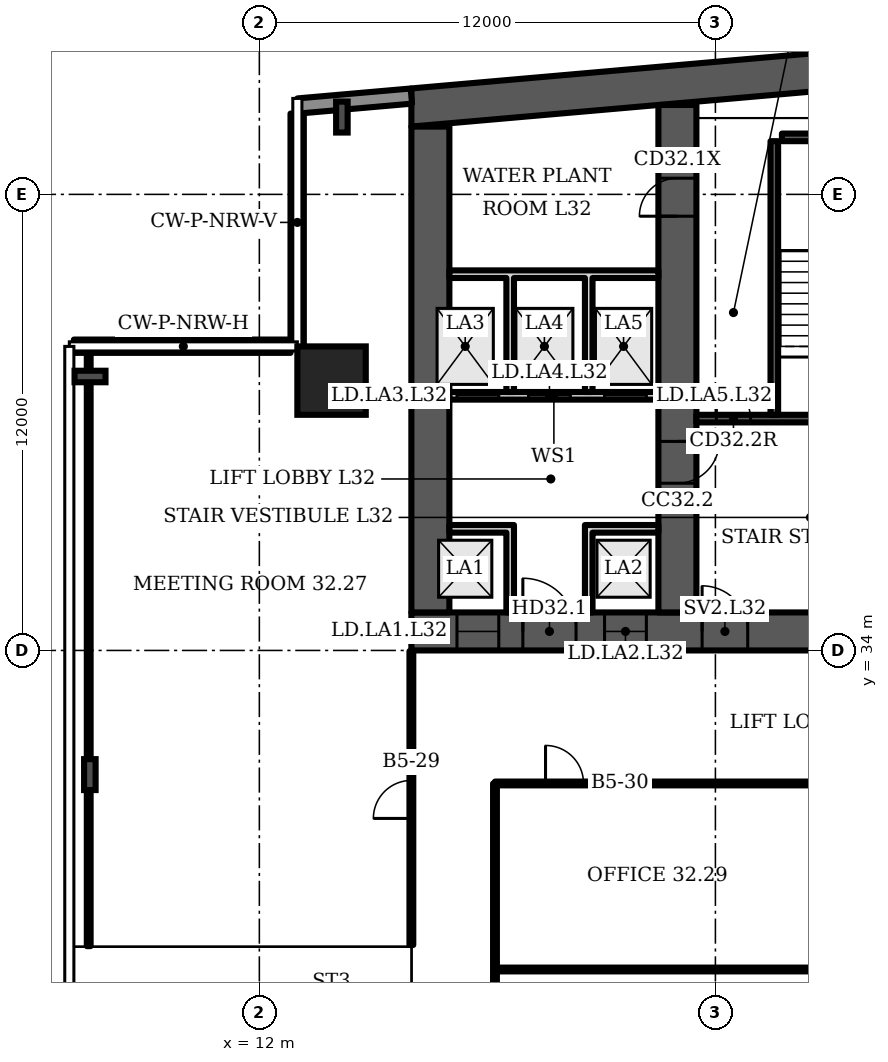
"""IFC4 building model, lengths in metres.
Left out: names, types, materials, properties, quantities, classifications, styles, units other than length and angle.
Written with IfcOpenShell. Run it as: python <this file> out.ifc"""

import sys

from ifc_helpers import new_model, si_unit, direction, frame, frame_2d, origin, origin_2d, place, context, subcontext, project, spatial, polyline, rectangle, i_section, outline, extrude, element, fill, save


model = new_model("IFC4")
c1 = context("Model", 3, precision=1e-05, world=origin(), true_north=direction((0.0, 1.0)))
c2 = subcontext(c1, "Body", "Model", "MODEL_VIEW")
j1 = project(units=[si_unit("LENGTHUNIT", "METRE"), si_unit("PLANEANGLEUNIT", "RADIAN")], contexts=[c1])
p1 = place(None, origin())
s1 = spatial("IfcSite", under=j1, at=p1, CompositionType="ELEMENT")
p2 = place(p1, origin())
s2 = spatial("IfcBuilding", under=s1, at=p2, CompositionType="ELEMENT")
p3 = place(p2, frame((0.0, 0.0, 136.3)))
s3 = spatial("IfcBuildingStorey", under=s2, at=p3, CompositionType="ELEMENT", Elevation=136.3)
p4 = place(p3, frame((0.0, 0.0, -0.0)))
e1 = element("IfcWall", 1, at=p4, inside=s3, PredefinedType="SHEAR", context=c2, shape_type="SweptSolid", body=[
    extrude(outline(polyline([(16.0, 47.784), (40.5, 49.927), (65.0, 47.784), (65.0, 48.787), (40.5, 50.931), (16.0, 48.787), (16.0, 47.784)])), origin(), (0.0, 0.0, 1.0), 3.6),
])
p5 = place(p3, frame((16.0, 34.5, 0.0), z_axis=(0.0, 0.0, 1.0), x_axis=(1.0, 0.0, 0.0)))
e2 = element("IfcWall", 2, at=p5, inside=s3, PredefinedType="SHEAR", context=c2, shape_type="SweptSolid", body=[
    extrude(rectangle(XDim=49.0, YDim=1.0, at=frame_2d((24.5, 0.0))), origin(), (0.0, 0.0, 1.0), 3.6),
])
p6 = place(p5, frame((1.2, 0.0, 0.0)))
e3 = element("IfcOpeningElement", 3, at=p6, cuts=e2, PredefinedType="OPENING", context=c2, shape_type="SweptSolid", body=[
    extrude(rectangle(XDim=1.1, YDim=2.1, at=frame_2d((0.55, 1.05))), frame((0.0, 0.51, 0.0), z_axis=(0.0, -1.0, 0.0), x_axis=(1.0, 0.0, 0.0)), (0.0, 0.0, 1.0), 1.02),
])
p7 = place(p5, frame((5.083, 0.0, 0.0)))
e4 = element("IfcOpeningElement", 4, at=p7, cuts=e2, PredefinedType="OPENING", context=c2, shape_type="SweptSolid", body=[
    extrude(rectangle(XDim=1.1, YDim=2.1, at=frame_2d((0.55, 1.05))), frame((0.0, 0.51, 0.0), z_axis=(0.0, -1.0, 0.0), x_axis=(1.0, 0.0, 0.0)), (0.0, 0.0, 1.0), 1.02),
])
p8 = place(p5, frame((2.933, 0.0, 0.0)))
e5 = element("IfcOpeningElement", 5, at=p8, cuts=e2, PredefinedType="OPENING", context=c2, shape_type="SweptSolid", body=[
    extrude(rectangle(XDim=1.4, YDim=2.1, at=frame_2d((0.7, 1.05))), frame((0.0, 0.51, 0.0), z_axis=(0.0, -1.0, 0.0), x_axis=(1.0, 0.0, 0.0)), (0.0, 0.0, 1.0), 1.02),
])
p9 = place(p5, frame((7.65, 0.0, 0.0)))
e6 = element("IfcOpeningElement", 6, at=p9, cuts=e2, PredefinedType="OPENING", context=c2, shape_type="SweptSolid", body=[
    extrude(rectangle(XDim=1.2, YDim=2.1, at=frame_2d((0.6, 1.05))), frame((0.0, 0.51, 0.0), z_axis=(0.0, -1.0, 0.0), x_axis=(1.0, 0.0, 0.0)), (0.0, 0.0, 1.0), 1.02),
])
p10 = place(p5, frame((14.817, 0.0, 0.0)))
e7 = element("IfcOpeningElement", 7, at=p10, cuts=e2, PredefinedType="OPENING", context=c2, shape_type="SweptSolid", body=[
    extrude(rectangle(XDim=1.1, YDim=2.1, at=frame_2d((0.55, 1.05))), frame((0.0, 0.51, 0.0), z_axis=(0.0, -1.0, 0.0), x_axis=(1.0, 0.0, 0.0)), (0.0, 0.0, 1.0), 1.02),
])
p11 = place(p5, frame((19.083, 0.0, 0.0)))
e8 = element("IfcOpeningElement", 8, at=p11, cuts=e2, PredefinedType="OPENING", context=c2, shape_type="SweptSolid", body=[
    extrude(rectangle(XDim=1.1, YDim=2.1, at=frame_2d((0.55, 1.05))), frame((0.0, 0.51, 0.0), z_axis=(0.0, -1.0, 0.0), x_axis=(1.0, 0.0, 0.0)), (0.0, 0.0, 1.0), 1.02),
])
p12 = place(p5, frame((16.8, 0.0, 0.0)))
e9 = element("IfcOpeningElement", 9, at=p12, cuts=e2, PredefinedType="OPENING", context=c2, shape_type="SweptSolid", body=[
    extrude(rectangle(XDim=1.4, YDim=2.1, at=frame_2d((0.7, 1.05))), frame((0.0, 0.51, 0.0), z_axis=(0.0, -1.0, 0.0), x_axis=(1.0, 0.0, 0.0)), (0.0, 0.0, 1.0), 1.02),
])
p13 = place(p5, frame((21.817, 0.0, 0.0)))
e10 = element("IfcOpeningElement", 10, at=p13, cuts=e2, PredefinedType="OPENING", context=c2, shape_type="SweptSolid", body=[
    extrude(rectangle(XDim=1.1, YDim=2.1, at=frame_2d((0.55, 1.05))), frame((0.0, 0.51, 0.0), z_axis=(0.0, -1.0, 0.0), x_axis=(1.0, 0.0, 0.0)), (0.0, 0.0, 1.0), 1.02),
])
p14 = place(p5, frame((26.083, 0.0, 0.0)))
e11 = element("IfcOpeningElement", 11, at=p14, cuts=e2, PredefinedType="OPENING", context=c2, shape_type="SweptSolid", body=[
    extrude(rectangle(XDim=1.1, YDim=2.1, at=frame_2d((0.55, 1.05))), frame((0.0, 0.51, 0.0), z_axis=(0.0, -1.0, 0.0), x_axis=(1.0, 0.0, 0.0)), (0.0, 0.0, 1.0), 1.02),
])
p15 = place(p5, frame((33.15, 0.0, 0.0)))
e12 = element("IfcOpeningElement", 12, at=p15, cuts=e2, PredefinedType="OPENING", context=c2, shape_type="SweptSolid", body=[
    extrude(rectangle(XDim=1.2, YDim=2.1, at=frame_2d((0.6, 1.05))), frame((0.0, 0.51, 0.0), z_axis=(0.0, -1.0, 0.0), x_axis=(1.0, 0.0, 0.0)), (0.0, 0.0, 1.0), 1.02),
])
p16 = place(p5, frame((37.8, 0.0, 0.0)))
e13 = element("IfcOpeningElement", 13, at=p16, cuts=e2, PredefinedType="OPENING", context=c2, shape_type="SweptSolid", body=[
    extrude(rectangle(XDim=1.4, YDim=2.1, at=frame_2d((0.7, 1.05))), frame((0.0, 0.51, 0.0), z_axis=(0.0, -1.0, 0.0), x_axis=(1.0, 0.0, 0.0)), (0.0, 0.0, 1.0), 1.02),
])
p17 = place(p5, frame((42.817, 0.0, 0.0)))
e14 = element("IfcOpeningElement", 14, at=p17, cuts=e2, PredefinedType="OPENING", context=c2, shape_type="SweptSolid", body=[
    extrude(rectangle(XDim=1.1, YDim=2.1, at=frame_2d((0.55, 1.05))), frame((0.0, 0.51, 0.0), z_axis=(0.0, -1.0, 0.0), x_axis=(1.0, 0.0, 0.0)), (0.0, 0.0, 1.0), 1.02),
])
p18 = place(p5, frame((46.7, 0.0, 0.0)))
e15 = element("IfcOpeningElement", 15, at=p18, cuts=e2, PredefinedType="OPENING", context=c2, shape_type="SweptSolid", body=[
    extrude(rectangle(XDim=1.1, YDim=2.1, at=frame_2d((0.55, 1.05))), frame((0.0, 0.51, 0.0), z_axis=(0.0, -1.0, 0.0), x_axis=(1.0, 0.0, 0.0)), (0.0, 0.0, 1.0), 1.02),
])
p19 = place(p5, frame((44.667, 0.0, 0.0)))
e16 = element("IfcOpeningElement", 16, at=p19, cuts=e2, PredefinedType="OPENING", context=c2, shape_type="SweptSolid", body=[
    extrude(rectangle(XDim=1.4, YDim=2.1, at=frame_2d((0.7, 1.05))), frame((0.0, 0.51, 0.0), z_axis=(0.0, -1.0, 0.0), x_axis=(1.0, 0.0, 0.0)), (0.0, 0.0, 1.0), 1.02),
])
p20 = place(p3, frame((16.5, 35.0, 0.0), z_axis=(0.0, 0.0, 1.0), x_axis=(0.0, 1.0, 0.0)))
e17 = element("IfcWall", 17, at=p20, inside=s3, PredefinedType="SHEAR", context=c2, shape_type="SweptSolid", body=[
    extrude(rectangle(XDim=12.784, YDim=1.0, at=frame_2d((6.392, 0.0))), origin(), (0.0, 0.0, 1.0), 3.6),
])
p21 = place(p3, frame((23.0, 35.0, 0.0), z_axis=(0.0, 0.0, 1.0), x_axis=(0.0, 1.0, 0.0)))
e18 = element("IfcWall", 18, at=p21, inside=s3, PredefinedType="SHEAR", context=c2, shape_type="SweptSolid", body=[
    extrude(rectangle(XDim=13.352, YDim=1.0, at=frame_2d((6.676, 0.0))), origin(), (0.0, 0.0, 1.0), 3.6),
])
p22 = place(p21, frame((10.426, 0.0, 0.0)))
e19 = element("IfcOpeningElement", 19, at=p22, cuts=e18, PredefinedType="OPENING", context=c2, shape_type="SweptSolid", body=[
    extrude(rectangle(XDim=1.0, YDim=2.1, at=frame_2d((0.5, 1.05))), frame((0.0, 0.51, 0.0), z_axis=(0.0, -1.0, 0.0), x_axis=(1.0, 0.0, 0.0)), (0.0, 0.0, 1.0), 1.02),
])
p23 = place(p21, frame((3.4, 0.0, 0.0)))
e20 = element("IfcOpeningElement", 20, at=p23, cuts=e18, PredefinedType="OPENING", context=c2, shape_type="SweptSolid", body=[
    extrude(rectangle(XDim=1.1, YDim=2.1, at=frame_2d((0.55, 1.05))), frame((0.0, 0.51, 0.0), z_axis=(0.0, -1.0, 0.0), x_axis=(1.0, 0.0, 0.0)), (0.0, 0.0, 1.0), 1.02),
])
p24 = place(p3, frame((13.9, 41.1, 0.0), z_axis=(0.0, 0.0, 1.0), x_axis=(1.0, 0.0, 0.0)))
e21 = element("IfcColumn", 21, at=p24, inside=s3, PredefinedType="COLUMN", context=c2, shape_type="SweptSolid", body=[
    extrude(rectangle(XDim=1.8, YDim=1.8, at=origin_2d()), origin(), (0.0, 0.0, 1.0), 3.6),
])
for number, where, z_axis, x_axis in (
    (22, (14.172, 48.034, 0.0), (0.0, 0.0, 1.0), (-1.0, 0.0, 0.0)),
    (23, (7.544, 41.208, 0.0), (0.0, 0.0, 1.0), (0.0, 1.0, 0.0)),
    (24, (7.54, 30.733, 0.0), (0.0, 0.0, 1.0), (-1.0, 0.0, 0.0)),
):
    element("IfcColumn", number, at=place(p3, frame(where, z_axis=z_axis, x_axis=x_axis)), inside=s3, PredefinedType="COLUMN", context=c2, shape_type="SweptSolid", body=[
        extrude(i_section(OverallWidth=0.303, OverallDepth=0.814, WebThickness=0.021, FlangeThickness=0.04, FilletRadius=0.03, at=origin_2d()), origin(), (0.0, 0.0, 1.0), 3.6),
    ])
p25 = place(p3, frame((16.0, 48.587, 0.0), z_axis=(0.0, 0.0, 1.0), x_axis=(-0.996194, -0.087168, 0.0)))
e25 = element("IfcWall", 25, at=p25, inside=s3, PredefinedType="SOLIDWALL", context=c2, shape_type="SweptSolid", body=[
    extrude(rectangle(XDim=2.994, YDim=0.4, at=frame_2d((1.497, 0.0))), origin(), (0.0, 0.0, 1.0), 3.2),
])
p26 = place(p3, frame((12.995, 48.126, 0.0), z_axis=(0.0, 0.0, 1.0), x_axis=(0.0, -1.0, 0.0)))
e26 = element("IfcWall", 26, at=p26, inside=s3, PredefinedType="SOLIDWALL", context=c2, shape_type="SweptSolid", body=[
    extrude(rectangle(XDim=6.126, YDim=0.35, at=frame_2d((3.063, 0.0))), origin(), (0.0, 0.0, 1.0), 1.0),
])
p27 = place(p3, frame((12.82, 42.005, 0.0), z_axis=(0.0, 0.0, 1.0), x_axis=(-1.0, 0.0, 0.0)))
e27 = element("IfcWall", 27, at=p27, inside=s3, PredefinedType="SOLIDWALL", context=c2, shape_type="SweptSolid", body=[
    extrude(rectangle(XDim=5.7, YDim=0.35, at=frame_2d((2.85, 0.0))), origin(), (0.0, 0.0, 1.0), 1.0),
])
p28 = place(p3, frame((17.0, 40.7, 0.0), z_axis=(0.0, 0.0, 1.0), x_axis=(1.0, 0.0, 0.0)))
e28 = element("IfcWall", 28, at=p28, inside=s3, PredefinedType="PARTITIONING", context=c2, shape_type="SweptSolid", body=[
    extrude(rectangle(XDim=5.5, YDim=0.2, at=frame_2d((2.75, 0.0))), origin(), (0.0, 0.0, 1.0), 3.2),
])
p29 = place(p28, frame((0.2, 0.0, 0.0)))
e29 = element("IfcOpeningElement", 29, at=p29, cuts=e28, PredefinedType="OPENING", context=c2, shape_type="SweptSolid", body=[
    extrude(rectangle(XDim=1.1, YDim=2.1, at=frame_2d((0.55, 1.05))), frame((0.0, 0.11, 0.0), z_axis=(0.0, -1.0, 0.0), x_axis=(1.0, 0.0, 0.0)), (0.0, 0.0, 1.0), 0.22),
])
p30 = place(p28, frame((2.083, 0.0, 0.0)))
e30 = element("IfcOpeningElement", 30, at=p30, cuts=e28, PredefinedType="OPENING", context=c2, shape_type="SweptSolid", body=[
    extrude(rectangle(XDim=1.1, YDim=2.1, at=frame_2d((0.55, 1.05))), frame((0.0, 0.11, 0.0), z_axis=(0.0, -1.0, 0.0), x_axis=(1.0, 0.0, 0.0)), (0.0, 0.0, 1.0), 0.22),
])
p31 = place(p28, frame((4.083, 0.0, 0.0)))
e31 = element("IfcOpeningElement", 31, at=p31, cuts=e28, PredefinedType="OPENING", context=c2, shape_type="SweptSolid", body=[
    extrude(rectangle(XDim=1.1, YDim=2.1, at=frame_2d((0.55, 1.05))), frame((0.0, 0.11, 0.0), z_axis=(0.0, -1.0, 0.0), x_axis=(1.0, 0.0, 0.0)), (0.0, 0.0, 1.0), 0.22),
])
p32 = place(p3, frame((0.0, 0.0, -0.0)))
e32 = element("IfcWall", 32, at=p32, inside=s3, PredefinedType="PARTITIONING", context=c2, shape_type="SweptSolid", body=[
    extrude(outline(polyline([(18.5, 37.1), (17.0, 37.1), (17.0, 37.3), (18.5, 37.3), (18.7, 37.3), (18.7, 35.0), (18.5, 35.0), (18.5, 37.1)])), origin(), (0.0, 0.0, 1.0), 3.2),
])
p33 = place(p3, frame((0.0, 0.0, -0.0)))
e33 = element("IfcWall", 33, at=p33, inside=s3, PredefinedType="PARTITIONING", context=c2, shape_type="SweptSolid", body=[
    extrude(outline(polyline([(20.567, 37.3), (20.767, 37.3), (22.5, 37.3), (22.5, 37.1), (20.767, 37.1), (20.767, 35.0), (20.567, 35.0), (20.567, 37.3)])), origin(), (0.0, 0.0, 1.0), 3.2),
])
p34 = place(p3, frame((0.0, 0.0, -0.0)))
e34 = element("IfcWall", 34, at=p34, inside=s3, PredefinedType="PARTITIONING", context=c2, shape_type="SweptSolid", body=[
    extrude(outline(polyline([(18.7, 40.8), (18.5, 40.8), (18.5, 43.8), (17.0, 43.8), (17.0, 44.0), (22.5, 44.0), (22.5, 43.8), (20.767, 43.8), (20.767, 40.8), (20.567, 40.8), (20.567, 43.8), (18.7, 43.8), (18.7, 40.8)])), origin(), (0.0, 0.0, 1.0), 3.2),
])
p35 = place(p3, frame((23.5, 40.1, 0.0), z_axis=(0.0, 0.0, 1.0), x_axis=(1.0, 0.0, 0.0)))
e35 = element("IfcWall", 35, at=p35, inside=s3, PredefinedType="SHEAR", context=c2, shape_type="SweptSolid", body=[
    extrude(rectangle(XDim=6.0, YDim=0.2, at=frame_2d((3.0, 0.0))), origin(), (0.0, 0.0, 1.0), 3.2),
])
p36 = place(p35, frame((3.425, 0.0, 0.0)))
e36 = element("IfcOpeningElement", 36, at=p36, cuts=e35, PredefinedType="OPENING", context=c2, shape_type="SweptSolid", body=[
    extrude(rectangle(XDim=1.2, YDim=2.1, at=frame_2d((0.6, 1.05))), frame((0.0, 0.11, 0.0), z_axis=(0.0, -1.0, 0.0), x_axis=(1.0, 0.0, 0.0)), (0.0, 0.0, 1.0), 0.22),
])
p37 = place(p35, frame((0.525, 0.0, 0.0)))
e37 = element("IfcOpeningElement", 37, at=p37, cuts=e35, PredefinedType="OPENING", context=c2, shape_type="SweptSolid", body=[
    extrude(rectangle(XDim=0.9, YDim=2.1, at=frame_2d((0.45, 1.05))), frame((0.0, 0.11, 0.0), z_axis=(0.0, -1.0, 0.0), x_axis=(1.0, 0.0, 0.0)), (0.0, 0.0, 1.0), 0.22),
])
p38 = place(p3, frame((25.55, 40.2, 0.0), z_axis=(0.0, 0.0, 1.0), x_axis=(0.0, 1.0, 0.0)))
e38 = element("IfcWall", 38, at=p38, inside=s3, PredefinedType="SHEAR", context=c2, shape_type="SweptSolid", body=[
    extrude(rectangle(XDim=7.2, YDim=0.2, at=frame_2d((3.6, 0.0))), origin(), (0.0, 0.0, 1.0), 3.2),
])
p39 = place(p3, frame((25.75, 47.5, 0.0), z_axis=(0.0, 0.0, 1.0), x_axis=(1.0, 0.0, 0.0)))
e39 = element("IfcWall", 39, at=p39, inside=s3, PredefinedType="SHEAR", context=c2, shape_type="SweptSolid", body=[
    extrude(rectangle(XDim=3.75, YDim=0.2, at=frame_2d((1.875, 0.0))), origin(), (0.0, 0.0, 1.0), 3.2),
])
p40 = place(p3, frame((7.51, 26.22, 0.0), z_axis=(0.0, 0.0, 1.0), x_axis=(0.0, 1.0, 0.0)))
e40 = element("IfcWall", 40, at=p40, inside=s3, PredefinedType="PARTITIONING", context=c2, shape_type="SweptSolid", body=[
    extrude(rectangle(XDim=15.76, YDim=0.1, at=frame_2d((7.88, 0.0))), origin(), (0.0, 0.0, 1.0), 2.58),
])
p41 = place(p3, frame((16.0, 26.25, 0.0), z_axis=(0.0, 0.0, 1.0), x_axis=(0.0, 1.0, 0.0)))
e41 = element("IfcWall", 41, at=p41, inside=s3, PredefinedType="PARTITIONING", context=c2, shape_type="SweptSolid", body=[
    extrude(rectangle(XDim=7.73, YDim=0.1, at=frame_2d((3.865, 0.0))), origin(), (0.0, 0.0, 1.0), 3.2),
])
p42 = place(p41, frame((3.33, 0.0, 0.0)))
e42 = element("IfcOpeningElement", 42, at=p42, cuts=e41, PredefinedType="OPENING", context=c2, shape_type="SweptSolid", body=[
    extrude(rectangle(XDim=1.0, YDim=2.1, at=frame_2d((0.5, 1.05))), frame((0.0, 0.06, 0.0), z_axis=(0.0, -1.0, 0.0), x_axis=(1.0, 0.0, 0.0)), (0.0, 0.0, 1.0), 0.12),
])
p43 = place(p3, frame((18.2, 23.8, 0.0), z_axis=(0.0, 0.0, 1.0), x_axis=(0.0, 1.0, 0.0)))
e43 = element("IfcWall", 43, at=p43, inside=s3, PredefinedType="PARTITIONING", context=c2, shape_type="SweptSolid", body=[
    extrude(rectangle(XDim=6.7, YDim=0.1, at=frame_2d((3.35, 0.0))), origin(), (0.0, 0.0, 1.0), 3.2),
])
p44 = place(p3, frame((18.2, 25.605, 0.0), z_axis=(0.0, 0.0, 1.0), x_axis=(1.0, 0.0, 0.0)))
e44 = element("IfcWall", 44, at=p44, inside=s3, PredefinedType="PARTITIONING", context=c2, shape_type="SweptSolid", body=[
    extrude(rectangle(XDim=8.55, YDim=0.1, at=frame_2d((4.275, 0.0))), origin(), (0.0, 0.0, 1.0), 3.2),
])
p45 = place(p3, frame((18.2, 30.5, 0.0), z_axis=(0.0, 0.0, 1.0), x_axis=(1.0, 0.0, 0.0)))
e45 = element("IfcWall", 45, at=p45, inside=s3, PredefinedType="PARTITIONING", context=c2, shape_type="SweptSolid", body=[
    extrude(rectangle(XDim=18.65, YDim=0.1, at=frame_2d((9.325, 0.0))), origin(), (0.0, 0.0, 1.0), 3.2),
])
p46 = place(p45, frame((1.33, 0.0, 0.0)))
e46 = element("IfcOpeningElement", 46, at=p46, cuts=e45, PredefinedType="OPENING", context=c2, shape_type="SweptSolid", body=[
    extrude(rectangle(XDim=1.0, YDim=2.1, at=frame_2d((0.5, 1.05))), frame((0.0, 0.06, 0.0), z_axis=(0.0, -1.0, 0.0), x_axis=(1.0, 0.0, 0.0)), (0.0, 0.0, 1.0), 0.12),
])
p47 = place(p45, frame((13.17, 0.0, 0.0)))
e47 = element("IfcOpeningElement", 47, at=p47, cuts=e45, PredefinedType="OPENING", context=c2, shape_type="SweptSolid", body=[
    extrude(rectangle(XDim=1.0, YDim=2.1, at=frame_2d((0.5, 1.05))), frame((0.0, 0.06, 0.0), z_axis=(0.0, -1.0, 0.0), x_axis=(1.0, 0.0, 0.0)), (0.0, 0.0, 1.0), 0.12),
])
p48 = place(p6, origin())
e48 = element("IfcDoor", 48, at=p48, inside=s3, OperationType="DOUBLE_DOOR_SLIDING", PredefinedType="DOOR", context=c2, shape_type="SweptSolid", body=[
    extrude(rectangle(XDim=1.1, YDim=2.1, at=frame_2d((0.55, 1.05))), frame((0.0, 0.025, 0.0), z_axis=(0.0, -1.0, 0.0), x_axis=(1.0, 0.0, 0.0)), (0.0, 0.0, 1.0), 0.05),
])
fill(e3, e48)
p49 = place(p7, origin())
e49 = element("IfcDoor", 49, at=p49, inside=s3, OperationType="DOUBLE_DOOR_SLIDING", PredefinedType="DOOR", context=c2, shape_type="SweptSolid", body=[
    extrude(rectangle(XDim=1.1, YDim=2.1, at=frame_2d((0.55, 1.05))), frame((0.0, 0.025, 0.0), z_axis=(0.0, -1.0, 0.0), x_axis=(1.0, 0.0, 0.0)), (0.0, 0.0, 1.0), 0.05),
])
fill(e4, e49)
p50 = place(p8, origin())
e50 = element("IfcDoor", 50, at=p50, inside=s3, OperationType="DOUBLE_DOOR_SINGLE_SWING", PredefinedType="DOOR", context=c2, shape_type="SweptSolid", body=[
    extrude(rectangle(XDim=1.4, YDim=2.1, at=frame_2d((0.7, 1.05))), frame((0.0, 0.025, 0.0), z_axis=(0.0, -1.0, 0.0), x_axis=(1.0, 0.0, 0.0)), (0.0, 0.0, 1.0), 0.05),
])
fill(e5, e50)
p51 = place(p29, origin())
e51 = element("IfcDoor", 51, at=p51, inside=s3, OperationType="DOUBLE_DOOR_SLIDING", PredefinedType="DOOR", context=c2, shape_type="SweptSolid", body=[
    extrude(rectangle(XDim=1.1, YDim=2.1, at=frame_2d((0.55, 1.05))), frame((0.0, 0.025, 0.0), z_axis=(0.0, -1.0, 0.0), x_axis=(1.0, 0.0, 0.0)), (0.0, 0.0, 1.0), 0.05),
])
fill(e29, e51)
p52 = place(p30, origin())
e52 = element("IfcDoor", 52, at=p52, inside=s3, OperationType="DOUBLE_DOOR_SLIDING", PredefinedType="DOOR", context=c2, shape_type="SweptSolid", body=[
    extrude(rectangle(XDim=1.1, YDim=2.1, at=frame_2d((0.55, 1.05))), frame((0.0, 0.025, 0.0), z_axis=(0.0, -1.0, 0.0), x_axis=(1.0, 0.0, 0.0)), (0.0, 0.0, 1.0), 0.05),
])
fill(e30, e52)
p53 = place(p31, origin())
e53 = element("IfcDoor", 53, at=p53, inside=s3, OperationType="DOUBLE_DOOR_SLIDING", PredefinedType="DOOR", context=c2, shape_type="SweptSolid", body=[
    extrude(rectangle(XDim=1.1, YDim=2.1, at=frame_2d((0.55, 1.05))), frame((0.0, 0.025, 0.0), z_axis=(0.0, -1.0, 0.0), x_axis=(1.0, 0.0, 0.0)), (0.0, 0.0, 1.0), 0.05),
])
fill(e31, e53)
p54 = place(p22, origin())
e54 = element("IfcDoor", 54, at=p54, inside=s3, OperationType="SINGLE_SWING_LEFT", PredefinedType="DOOR", context=c2, shape_type="SweptSolid", body=[
    extrude(rectangle(XDim=1.0, YDim=2.1, at=frame_2d((0.5, 1.05))), frame((0.0, 0.5, 0.0), z_axis=(0.0, -1.0, 0.0), x_axis=(1.0, 0.0, 0.0)), (0.0, 0.0, 1.0), 1.0),
])
fill(e19, e54)
p55 = place(p37, origin())
e55 = element("IfcDoor", 55, at=p55, inside=s3, OperationType="SINGLE_SWING_LEFT", PredefinedType="DOOR", context=c2, shape_type="SweptSolid", body=[
    extrude(rectangle(XDim=0.9, YDim=2.1, at=frame_2d((0.45, 1.05))), frame((0.0, 0.025, 0.0), z_axis=(0.0, -1.0, 0.0), x_axis=(1.0, 0.0, 0.0)), (0.0, 0.0, 1.0), 0.05),
])
fill(e37, e55)
p56 = place(p9, origin())
e56 = element("IfcDoor", 56, at=p56, inside=s3, OperationType="SINGLE_SWING_LEFT", PredefinedType="DOOR", context=c2, shape_type="SweptSolid", body=[
    extrude(rectangle(XDim=1.2, YDim=2.1, at=frame_2d((0.6, 1.05))), frame((0.0, 0.025, 0.0), z_axis=(0.0, -1.0, 0.0), x_axis=(1.0, 0.0, 0.0)), (0.0, 0.0, 1.0), 0.05),
])
fill(e6, e56)
p57 = place(p23, origin())
e57 = element("IfcDoor", 57, at=p57, inside=s3, OperationType="SINGLE_SWING_RIGHT", PredefinedType="DOOR", context=c2, shape_type="SweptSolid", body=[
    extrude(rectangle(XDim=1.1, YDim=2.1, at=frame_2d((0.55, 1.05))), frame((0.0, 0.025, 0.0), z_axis=(0.0, -1.0, 0.0), x_axis=(1.0, 0.0, 0.0)), (0.0, 0.0, 1.0), 0.05),
])
fill(e20, e57)
p58 = place(p42, origin())
e58 = element("IfcDoor", 58, at=p58, inside=s3, OperationType="SINGLE_SWING_LEFT", PredefinedType="DOOR", context=c2, shape_type="SweptSolid", body=[
    extrude(rectangle(XDim=1.0, YDim=2.1, at=frame_2d((0.5, 1.05))), frame((0.0, 0.025, 0.0), z_axis=(0.0, -1.0, 0.0), x_axis=(1.0, 0.0, 0.0)), (0.0, 0.0, 1.0), 0.05),
])
fill(e42, e58)
p59 = place(p46, origin())
e59 = element("IfcDoor", 59, at=p59, inside=s3, OperationType="SINGLE_SWING_LEFT", PredefinedType="DOOR", context=c2, shape_type="SweptSolid", body=[
    extrude(rectangle(XDim=1.0, YDim=2.1, at=frame_2d((0.5, 1.05))), frame((0.0, 0.025, 0.0), z_axis=(0.0, -1.0, 0.0), x_axis=(1.0, 0.0, 0.0)), (0.0, 0.0, 1.0), 0.05),
])
fill(e46, e59)
save(model, sys.argv[1])
